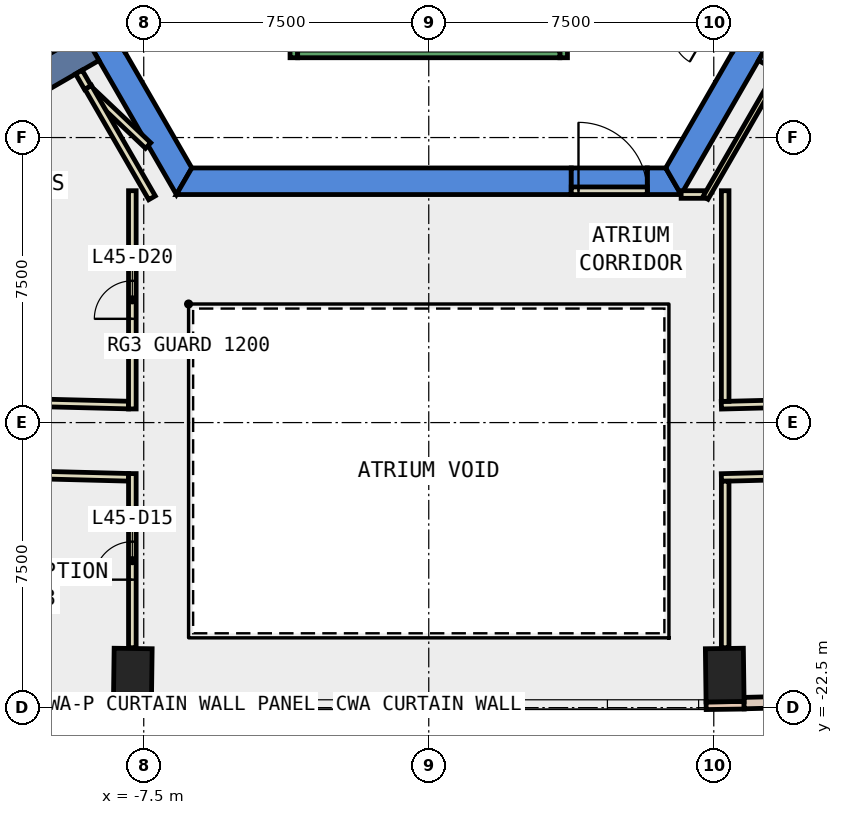
"""IFC4 building model, lengths in metres.
Left out: names, types, materials, properties, quantities, classifications, styles, units other than length and angle.
Written with IfcOpenShell. Run it as: python <this file> out.ifc"""

import sys

from ifc_helpers import new_model, si_unit, direction, frame, frame_2d, origin, origin_2d, place, context, subcontext, project, spatial, polyline, rectangle, outline, extrude, element, fill, save


model = new_model("IFC4")
c1 = context("Model", 3, precision=1e-05, world=origin(), true_north=direction((0.0, 1.0)))
c2 = subcontext(c1, "Body", "Model", "MODEL_VIEW")
j1 = project(units=[si_unit("LENGTHUNIT", "METRE"), si_unit("PLANEANGLEUNIT", "RADIAN")], contexts=[c1])
p1 = place(None, origin())
s1 = spatial("IfcSite", under=j1, at=p1, CompositionType="ELEMENT")
p2 = place(p1, origin())
s2 = spatial("IfcBuilding", under=s1, at=p2, CompositionType="ELEMENT")
p3 = place(p2, frame((0.0, 0.0, 202.4)))
s3 = spatial("IfcBuildingStorey", under=s2, at=p3, CompositionType="ELEMENT", Elevation=202.4)
for number, where, z_axis, x_axis in (
    (1, (-7.788, -21.644, -0.4), (0.0, 0.0, 1.0), (-1.0, 0.013, 0.0)),
    (2, (7.788, -21.644, -0.4), (0.0, 0.0, 1.0), (1.0, 0.013, 0.0)),
):
    element("IfcColumn", number, at=place(p3, frame(where, z_axis=z_axis, x_axis=x_axis)), inside=s3, PredefinedType="COLUMN", context=c2, shape_type="SweptSolid", body=[
        extrude(rectangle(XDim=1.0, YDim=1.4, at=origin_2d()), origin(), (0.0, 0.0, 1.0), 4.2),
    ])
p4 = place(p3, frame((0.0, 0.0, -0.4)))
e3 = element("IfcWall", 3, at=p4, inside=s3, PredefinedType="SHEAR", context=c2, shape_type="SweptSolid", body=[
    extrude(outline(polyline([(-13.279, 2.5), (-6.64, -9.0), (-6.235, -8.3), (-12.471, 2.5), (-13.279, 2.5)])), origin(), (0.0, 0.0, 1.0), 4.2),
])
p5 = place(p3, frame((0.0, 0.0, -0.4)))
e4 = element("IfcWall", 4, at=p5, inside=s3, PredefinedType="SHEAR", context=c2, shape_type="SweptSolid", body=[
    extrude(outline(polyline([(3.75, -9.0), (3.75, -8.3), (-6.235, -8.3), (-6.64, -9.0), (3.75, -9.0)])), origin(), (0.0, 0.0, 1.0), 4.2),
])
p6 = place(p3, frame((0.0, 0.0, -0.4)))
e5 = element("IfcWall", 5, at=p6, inside=s3, PredefinedType="SHEAR", context=c2, shape_type="SweptSolid", body=[
    extrude(outline(polyline([(5.75, -8.3), (5.75, -9.0), (6.64, -9.0), (6.235, -8.3), (5.75, -8.3)])), origin(), (0.0, 0.0, 1.0), 4.2),
])
p7 = place(p3, frame((0.0, 0.0, 3.6)))
e6 = element("IfcWall", 6, at=p7, inside=s3, PredefinedType="SHEAR", context=c2, shape_type="SweptSolid", body=[
    extrude(outline(polyline([(5.75, -9.0), (5.75, -8.3), (3.75, -8.3), (3.75, -9.0), (5.75, -9.0)])), origin(), (0.0, 0.0, 1.0), 0.2),
])
p8 = place(p3, frame((0.0, 0.0, -0.4)))
e7 = element("IfcWall", 7, at=p8, inside=s3, PredefinedType="SHEAR", context=c2, shape_type="SweptSolid", body=[
    extrude(outline(polyline([(6.64, -9.0), (13.279, 2.5), (12.471, 2.5), (6.235, -8.3), (6.64, -9.0)])), origin(), (0.0, 0.0, 1.0), 4.2),
])
for number, where, z_axis, x_axis in (
    (8, (8.877, -5.125, -0.4), (0.0, 0.0, 1.0), (0.866, -0.5, 0.0)),
    (9, (-8.877, -5.125, -0.4), (0.0, 0.0, 1.0), (-0.866, -0.5, 0.0)),
):
    element("IfcWall", number, at=place(p3, frame(where, z_axis=z_axis, x_axis=x_axis)), inside=s3, PredefinedType="SHEAR", context=c2, shape_type="SweptSolid", body=[
        extrude(rectangle(XDim=9.0, YDim=0.8, at=frame_2d((4.5, 0.0))), origin(), (0.0, 0.0, 1.0), 4.2),
    ])
for number, where, z_axis, x_axis in (
    (10, (-8.299, -22.437, 0.0), (0.0, 0.0, 1.0), (1.0, -0.014, 0.0)),
    (11, (7.299, -22.451, 0.0), (0.0, 0.0, 1.0), (1.0, 0.014, 0.0)),
):
    element("IfcWall", number, at=place(p3, frame(where, z_axis=z_axis, x_axis=x_axis)), inside=s3, PredefinedType="STANDARD", context=c2, shape_type="SweptSolid", body=[
        extrude(rectangle(XDim=1.0, YDim=0.2, at=frame_2d((0.5, 0.0))), origin(), (0.0, 0.0, 1.0), 3.8),
    ])
p9 = place(p3, frame((-13.681, -22.246, 0.0), z_axis=(0.0, 0.0, 1.0), x_axis=(0.999685717988, -0.025069209235, 0.0)))
e12 = element("IfcWall", 12, at=p9, inside=s3, PredefinedType="STANDARD", context=c2, shape_type="SweptSolid", body=[
    extrude(rectangle(XDim=5.385, YDim=0.3, at=frame_2d((2.693, 0.0))), origin(), (0.0, 0.0, 1.0), 3.8),
])
p10 = place(p9, frame((0.646, 0.0, 0.9)))
e13 = element("IfcOpeningElement", 13, at=p10, cuts=e12, PredefinedType="OPENING", context=c2, shape_type="SweptSolid", body=[
    extrude(rectangle(XDim=1.4, YDim=2.6, at=frame_2d((0.7, 1.3))), frame((0.0, 0.16, 0.0), z_axis=(0.0, -1.0, 0.0), x_axis=(1.0, 0.0, 0.0)), (0.0, 0.0, 1.0), 0.32),
])
p11 = place(p9, frame((3.339, 0.0, 0.9)))
e14 = element("IfcOpeningElement", 14, at=p11, cuts=e12, PredefinedType="OPENING", context=c2, shape_type="SweptSolid", body=[
    extrude(rectangle(XDim=1.4, YDim=2.6, at=frame_2d((0.7, 1.3))), frame((0.0, 0.16, 0.0), z_axis=(0.0, -1.0, 0.0), x_axis=(1.0, 0.0, 0.0)), (0.0, 0.0, 1.0), 0.32),
])
p12 = place(p3, frame((8.297, -22.381, 0.0), z_axis=(0.0, 0.0, 1.0), x_axis=(0.999685717988, 0.025069209235, 0.0)))
e15 = element("IfcWall", 15, at=p12, inside=s3, PredefinedType="STANDARD", context=c2, shape_type="SweptSolid", body=[
    extrude(rectangle(XDim=5.385, YDim=0.3, at=frame_2d((2.693, 0.0))), origin(), (0.0, 0.0, 1.0), 3.8),
])
p13 = place(p12, frame((0.646, 0.0, 0.9)))
e16 = element("IfcOpeningElement", 16, at=p13, cuts=e15, PredefinedType="OPENING", context=c2, shape_type="SweptSolid", body=[
    extrude(rectangle(XDim=1.4, YDim=2.6, at=frame_2d((0.7, 1.3))), frame((0.0, 0.16, 0.0), z_axis=(0.0, -1.0, 0.0), x_axis=(1.0, 0.0, 0.0)), (0.0, 0.0, 1.0), 0.32),
])
p14 = place(p12, frame((3.339, 0.0, 0.9)))
e17 = element("IfcOpeningElement", 17, at=p14, cuts=e15, PredefinedType="OPENING", context=c2, shape_type="SweptSolid", body=[
    extrude(rectangle(XDim=1.4, YDim=2.6, at=frame_2d((0.7, 1.3))), frame((0.0, 0.16, 0.0), z_axis=(0.0, -1.0, 0.0), x_axis=(1.0, 0.0, 0.0)), (0.0, 0.0, 1.0), 0.32),
])
p15 = place(p3, frame((7.7, -14.544, 0.0), z_axis=(0.0, 0.0, 1.0), x_axis=(0.99968218628, 0.025209649611, 0.0)))
e18 = element("IfcWall", 18, at=p15, inside=s3, PredefinedType="PARTITIONING", context=c2, shape_type="SweptSolid", body=[
    extrude(rectangle(XDim=6.227, YDim=0.2, at=frame_2d((3.114, 0.0))), origin(), (0.0, 0.0, 1.0), 3.8),
])
p16 = place(p3, frame((-11.009, -14.461, 0.0), z_axis=(0.0, 0.0, 1.0), x_axis=(0.999684451251, -0.025119672116, 0.0)))
e19 = element("IfcWall", 19, at=p16, inside=s3, PredefinedType="PARTITIONING", context=c2, shape_type="SweptSolid", body=[
    extrude(rectangle(XDim=3.11, YDim=0.2, at=frame_2d((1.555, 0.0))), origin(), (0.0, 0.0, 1.0), 3.8),
])
p17 = place(p3, frame((14.061, -16.284, 0.0), z_axis=(0.0, 0.0, 1.0), x_axis=(-0.999679323762, -0.025322907453, 0.0)))
e20 = element("IfcWall", 20, at=p17, inside=s3, PredefinedType="PARTITIONING", context=c2, shape_type="SweptSolid", body=[
    extrude(rectangle(XDim=6.363, YDim=0.2, at=frame_2d((3.182, 0.0))), origin(), (0.0, 0.0, 1.0), 3.8),
])
p18 = place(p17, frame((2.682, 0.0, 0.0)))
e21 = element("IfcOpeningElement", 21, at=p18, cuts=e20, PredefinedType="OPENING", context=c2, shape_type="SweptSolid", body=[
    extrude(rectangle(XDim=1.0, YDim=2.1, at=frame_2d((0.5, 1.05))), frame((0.0, 0.11, 0.0), z_axis=(0.0, -1.0, 0.0), x_axis=(1.0, 0.0, 0.0)), (0.0, 0.0, 1.0), 0.22),
])
p19 = place(p3, frame((-7.9, -16.44, 0.0), z_axis=(0.0, 0.0, 1.0), x_axis=(-0.999675117104, 0.025488433531, 0.0)))
e22 = element("IfcWall", 22, at=p19, inside=s3, PredefinedType="PARTITIONING", context=c2, shape_type="SweptSolid", body=[
    extrude(rectangle(XDim=2.864, YDim=0.2, at=frame_2d((1.432, 0.0))), origin(), (0.0, 0.0, 1.0), 3.8),
])
p20 = place(p3, frame((6.641, -8.999, 0.0), z_axis=(0.0, 0.0, 1.0), x_axis=(1.0, 0.0, 0.0)))
e23 = element("IfcWall", 23, at=p20, inside=s3, PredefinedType="PARTITIONING", context=c2, shape_type="SweptSolid", body=[
    extrude(rectangle(XDim=0.617, YDim=0.2, at=frame_2d((0.309, 0.0))), origin(), (0.0, 0.0, 1.0), 3.8),
])
p21 = place(p3, frame((7.283, -9.086, 0.0), z_axis=(0.0, 0.0, 1.0), x_axis=(0.500035303972, 0.866005020067, 0.0)))
e24 = element("IfcWall", 24, at=p21, inside=s3, PredefinedType="PARTITIONING", context=c2, shape_type="SweptSolid", body=[
    extrude(rectangle(XDim=3.828, YDim=0.15, at=frame_2d((1.914, 0.0))), origin(), (0.0, 0.0, 1.0), 3.8),
])
p22 = place(p3, frame((7.8, -8.899, 0.0), z_axis=(0.0, 0.0, 1.0), x_axis=(0.0, -1.0, 0.0)))
e25 = element("IfcWall", 25, at=p22, inside=s3, PredefinedType="PARTITIONING", context=c2, shape_type="SweptSolid", body=[
    extrude(rectangle(XDim=5.542, YDim=0.2, at=frame_2d((2.771, 0.0))), origin(), (0.0, 0.0, 1.0), 3.8),
])
p23 = place(p3, frame((-8.84, -6.332, 0.0), z_axis=(0.0, 0.0, 1.0), x_axis=(0.726080635734, -0.687609562479, 0.0)))
e26 = element("IfcWall", 26, at=p23, inside=s3, PredefinedType="PARTITIONING", context=c2, shape_type="SweptSolid", body=[
    extrude(rectangle(XDim=2.005, YDim=0.2, at=frame_2d((1.003, 0.0))), origin(), (0.0, 0.0, 1.0), 3.8),
])
p24 = place(p3, frame((-7.8, -14.641, 0.0), z_axis=(0.0, 0.0, 1.0), x_axis=(0.0, 1.0, 0.0)))
e27 = element("IfcWall", 27, at=p24, inside=s3, PredefinedType="PARTITIONING", context=c2, shape_type="SweptSolid", body=[
    extrude(rectangle(XDim=5.742, YDim=0.2, at=frame_2d((2.871, 0.0))), origin(), (0.0, 0.0, 1.0), 3.8),
])
p25 = place(p24, frame((2.371, 0.0, 0.0)))
e28 = element("IfcOpeningElement", 28, at=p25, cuts=e27, PredefinedType="OPENING", context=c2, shape_type="SweptSolid", body=[
    extrude(rectangle(XDim=1.0, YDim=2.1, at=frame_2d((0.5, 1.05))), frame((0.0, 0.11, 0.0), z_axis=(0.0, -1.0, 0.0), x_axis=(1.0, 0.0, 0.0)), (0.0, 0.0, 1.0), 0.22),
])
p26 = place(p3, frame((-7.283, -9.086, 0.0), z_axis=(0.0, 0.0, 1.0), x_axis=(-0.499883958536, 0.86609238999, 0.0)))
e29 = element("IfcWall", 29, at=p26, inside=s3, PredefinedType="PARTITIONING", context=c2, shape_type="SweptSolid", body=[
    extrude(rectangle(XDim=3.359, YDim=0.2, at=frame_2d((1.679, 0.0))), origin(), (0.0, 0.0, 1.0), 3.8),
])
p27 = place(p3, frame((7.8, -16.542, 0.0), z_axis=(0.0, 0.0, 1.0), x_axis=(0.0, -1.0, 0.0)))
e30 = element("IfcWall", 30, at=p27, inside=s3, PredefinedType="PARTITIONING", context=c2, shape_type="SweptSolid", body=[
    extrude(rectangle(XDim=4.382, YDim=0.2, at=frame_2d((2.191, 0.0))), origin(), (0.0, 0.0, 1.0), 3.8),
])
p28 = place(p3, frame((-7.8, -20.924, 0.0), z_axis=(0.0, 0.0, 1.0), x_axis=(0.0, 1.0, 0.0)))
e31 = element("IfcWall", 31, at=p28, inside=s3, PredefinedType="PARTITIONING", context=c2, shape_type="SweptSolid", body=[
    extrude(rectangle(XDim=4.582, YDim=0.2, at=frame_2d((2.291, 0.0))), origin(), (0.0, 0.0, 1.0), 3.8),
])
p29 = place(p28, frame((1.791, 0.0, 0.0)))
e32 = element("IfcOpeningElement", 32, at=p29, cuts=e31, PredefinedType="OPENING", context=c2, shape_type="SweptSolid", body=[
    extrude(rectangle(XDim=1.0, YDim=2.1, at=frame_2d((0.5, 1.05))), frame((0.0, 0.11, 0.0), z_axis=(0.0, -1.0, 0.0), x_axis=(1.0, 0.0, 0.0)), (0.0, 0.0, 1.0), 0.22),
])
p30 = place(p3, frame((-8.973, -6.183, 0.0), z_axis=(0.0, 0.0, 1.0), x_axis=(-0.499557093027, 0.86628096528, 0.0)))
e33 = element("IfcWall", 33, at=p30, inside=s3, PredefinedType="PARTITIONING", context=c2, shape_type="SweptSolid", body=[
    extrude(rectangle(XDim=0.469, YDim=0.2, at=frame_2d((0.234, 0.0))), origin(), (0.0, 0.0, 1.0), 3.8),
])
p31 = place(p3, frame((3.75, -8.9, 0.0), z_axis=(0.0, 0.0, 1.0), x_axis=(1.0, 0.0, 0.0)))
e34 = element("IfcWall", 34, at=p31, inside=s3, PredefinedType="PARTITIONING", context=c2, shape_type="SweptSolid", body=[
    extrude(rectangle(XDim=2.0, YDim=0.2, at=frame_2d((1.0, 0.0))), origin(), (0.0, 0.0, 1.0), 2.4),
])
p32 = place(p31, frame((0.19, 0.0, 0.0)))
e35 = element("IfcOpeningElement", 35, at=p32, cuts=e34, PredefinedType="OPENING", context=c2, shape_type="SweptSolid", body=[
    extrude(rectangle(XDim=1.8, YDim=2.1, at=frame_2d((0.9, 1.05))), frame((0.0, 0.11, 0.0), z_axis=(0.0, -1.0, 0.0), x_axis=(1.0, 0.0, 0.0)), (0.0, 0.0, 1.0), 0.22),
])
p33 = place(p3, frame((-3.55, -1.0, 0.0), z_axis=(0.0, 0.0, 1.0), x_axis=(0.0, -1.0, 0.0)))
e36 = element("IfcWall", 36, at=p33, inside=s3, PredefinedType="STANDARD", context=c2, shape_type="SweptSolid", body=[
    extrude(rectangle(XDim=4.4, YDim=0.2, at=frame_2d((2.2, 0.0))), origin(), (0.0, 0.0, 1.0), 3.8),
])
p34 = place(p33, frame((2.4, 0.0, 0.0)))
e37 = element("IfcOpeningElement", 37, at=p34, cuts=e36, PredefinedType="OPENING", context=c2, shape_type="SweptSolid", body=[
    extrude(rectangle(XDim=1.1, YDim=2.2, at=frame_2d((0.55, 1.1))), frame((0.0, 0.11, 0.0), z_axis=(0.0, -1.0, 0.0), x_axis=(1.0, 0.0, 0.0)), (0.0, 0.0, 1.0), 0.22),
])
p35 = place(p3, frame((3.55, -2.667, 0.0), z_axis=(0.0, 0.0, 1.0), x_axis=(0.0, -1.0, 0.0)))
e38 = element("IfcWall", 38, at=p35, inside=s3, PredefinedType="STANDARD", context=c2, shape_type="SweptSolid", body=[
    extrude(rectangle(XDim=2.733, YDim=0.2, at=frame_2d((1.366, 0.0))), origin(), (0.0, 0.0, 1.0), 3.8),
])
p36 = place(p3, frame((-3.45, -5.3, 0.0), z_axis=(0.0, 0.0, 1.0), x_axis=(1.0, 0.0, 0.0)))
e39 = element("IfcWall", 39, at=p36, inside=s3, PredefinedType="STANDARD", context=c2, shape_type="SweptSolid", body=[
    extrude(rectangle(XDim=6.9, YDim=0.2, at=frame_2d((3.45, 0.0))), origin(), (0.0, 0.0, 1.0), 3.8),
])
p37 = place(p11, origin())
e40 = element("IfcWindow", 40, at=p37, inside=s3, PartitioningType="SINGLE_PANEL", PredefinedType="WINDOW", context=c2, shape_type="SweptSolid", body=[
    extrude(rectangle(XDim=1.4, YDim=2.6, at=frame_2d((0.7, 1.3))), frame((0.0, 0.03, 0.0), z_axis=(0.0, -1.0, 0.0), x_axis=(1.0, 0.0, 0.0)), (0.0, 0.0, 1.0), 0.06),
])
fill(e14, e40)
p38 = place(p29, origin())
e41 = element("IfcDoor", 41, at=p38, inside=s3, OperationType="SINGLE_SWING_LEFT", PredefinedType="DOOR", context=c2, shape_type="SweptSolid", body=[
    extrude(rectangle(XDim=1.0, YDim=2.1, at=frame_2d((0.5, 1.05))), frame((0.0, 0.025, 0.0), z_axis=(0.0, -1.0, 0.0), x_axis=(1.0, 0.0, 0.0)), (0.0, 0.0, 1.0), 0.05),
])
fill(e32, e41)
p39 = place(p25, origin())
e42 = element("IfcDoor", 42, at=p39, inside=s3, OperationType="SINGLE_SWING_LEFT", PredefinedType="DOOR", context=c2, shape_type="SweptSolid", body=[
    extrude(rectangle(XDim=1.0, YDim=2.1, at=frame_2d((0.5, 1.05))), frame((0.0, 0.025, 0.0), z_axis=(0.0, -1.0, 0.0), x_axis=(1.0, 0.0, 0.0)), (0.0, 0.0, 1.0), 0.05),
])
fill(e28, e42)
p40 = place(p32, origin())
e43 = element("IfcDoor", 43, at=p40, inside=s3, OperationType="DOUBLE_DOOR_SINGLE_SWING", PredefinedType="DOOR", context=c2, shape_type="SweptSolid", body=[
    extrude(rectangle(XDim=1.8, YDim=2.1, at=frame_2d((0.9, 1.05))), frame((0.0, 0.025, 0.0), z_axis=(0.0, -1.0, 0.0), x_axis=(1.0, 0.0, 0.0)), (0.0, 0.0, 1.0), 0.05),
])
fill(e35, e43)
save(model, sys.argv[1])
